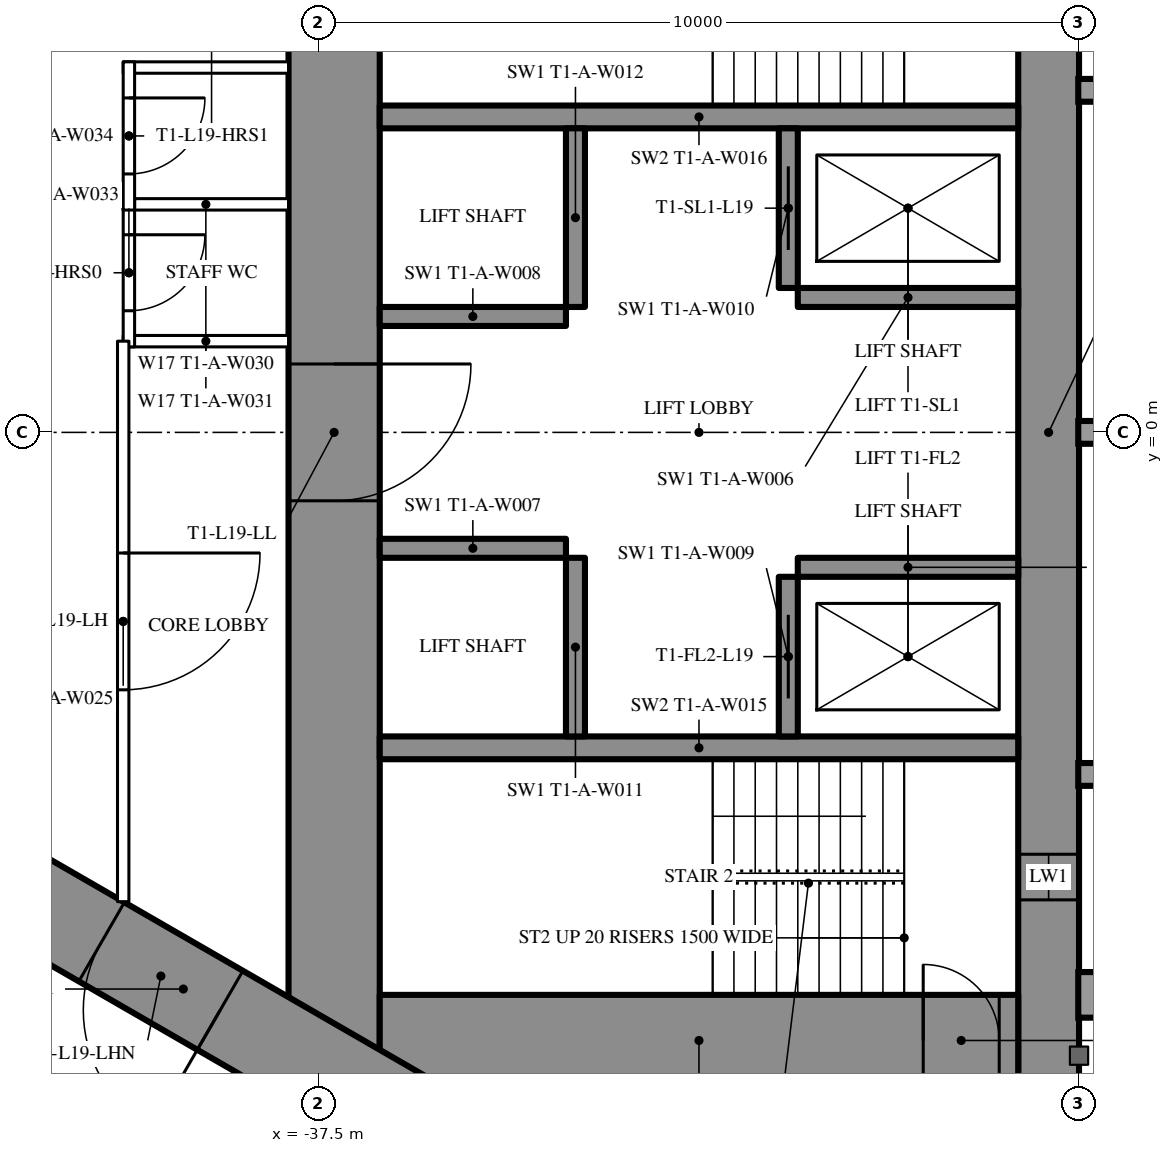
"""IFC4 building model, lengths in metres.
Left out: names, types, materials, properties, quantities, classifications, styles, units other than length and angle.
Written with IfcOpenShell. Run it as: python <this file> out.ifc"""

import sys

from ifc_helpers import new_model, si_unit, direction, frame, frame_2d, origin, place, context, subcontext, project, spatial, rectangle, extrude, element, fill, save


model = new_model("IFC4")
c1 = context("Model", 3, precision=1e-05, world=origin(), true_north=direction((0.0, 1.0)))
c2 = subcontext(c1, "Body", "Model", "MODEL_VIEW")
j1 = project(units=[si_unit("LENGTHUNIT", "METRE"), si_unit("PLANEANGLEUNIT", "RADIAN")], contexts=[c1])
p1 = place(None, origin())
s1 = spatial("IfcSite", under=j1, at=p1, CompositionType="ELEMENT")
p2 = place(p1, origin())
s2 = spatial("IfcBuilding", under=s1, at=p2, CompositionType="ELEMENT")
p3 = place(p2, frame((0.0, 0.0, 74.0)))
s3 = spatial("IfcBuildingStorey", under=s2, at=p3, CompositionType="ELEMENT", Elevation=74.0)
p4 = place(p3, frame((-27.9, 8.6, 0.0), z_axis=(0.0, 0.0, 1.0), x_axis=(0.0, -1.0, 0.0)))
e1 = element("IfcWall", 1, at=p4, inside=s3, PredefinedType="SHEAR", context=c2, shape_type="SweptSolid", body=[
    extrude(rectangle(XDim=17.2, YDim=0.8, at=frame_2d((8.6, 0.0))), origin(), (0.0, 0.0, 1.0), 3.5),
])
p5 = place(p4, frame((2.45, 0.0, 0.6)))
e2 = element("IfcOpeningElement", 2, at=p5, cuts=e1, PredefinedType="OPENING", context=c2, shape_type="SweptSolid", body=[
    extrude(rectangle(XDim=0.6, YDim=2.1, at=frame_2d((0.3, 1.05))), frame((0.0, 0.41, 0.0), z_axis=(0.0, -1.0, 0.0), x_axis=(1.0, 0.0, 0.0)), (0.0, 0.0, 1.0), 0.82),
])
p6 = place(p4, frame((14.15, 0.0, 0.6)))
e3 = element("IfcOpeningElement", 3, at=p6, cuts=e1, PredefinedType="OPENING", context=c2, shape_type="SweptSolid", body=[
    extrude(rectangle(XDim=0.6, YDim=2.1, at=frame_2d((0.3, 1.05))), frame((0.0, 0.41, 0.0), z_axis=(0.0, -1.0, 0.0), x_axis=(1.0, 0.0, 0.0)), (0.0, 0.0, 1.0), 0.82),
])
p7 = place(p3, frame((-37.3, 8.6, 0.0), z_axis=(0.0, 0.0, 1.0), x_axis=(0.0, -1.0, 0.0)))
e4 = element("IfcWall", 4, at=p7, inside=s3, PredefinedType="SHEAR", context=c2, shape_type="SweptSolid", body=[
    extrude(rectangle(XDim=17.2, YDim=1.2, at=frame_2d((8.6, 0.0))), origin(), (0.0, 0.0, 1.0), 3.5),
])
p8 = place(p7, frame((7.7, 0.0, 0.0)))
e5 = element("IfcOpeningElement", 5, at=p8, cuts=e4, PredefinedType="OPENING", context=c2, shape_type="SweptSolid", body=[
    extrude(rectangle(XDim=1.8, YDim=2.2, at=frame_2d((0.9, 1.1))), frame((0.0, 0.61, 0.0), z_axis=(0.0, -1.0, 0.0), x_axis=(1.0, 0.0, 0.0)), (0.0, 0.0, 1.0), 1.22),
])
p9 = place(p3, frame((-28.3, -8.0, 0.0), z_axis=(0.0, 0.0, 1.0), x_axis=(-1.0, 0.0, 0.0)))
e6 = element("IfcWall", 6, at=p9, inside=s3, PredefinedType="SHEAR", context=c2, shape_type="SweptSolid", body=[
    extrude(rectangle(XDim=8.4, YDim=1.2, at=frame_2d((4.2, 0.0))), origin(), (0.0, 0.0, 1.0), 3.5),
])
p10 = place(p9, frame((0.25, 0.0, 0.0)))
e7 = element("IfcOpeningElement", 7, at=p10, cuts=e6, PredefinedType="OPENING", context=c2, shape_type="SweptSolid", body=[
    extrude(rectangle(XDim=1.0, YDim=2.2, at=frame_2d((0.5, 1.1))), frame((0.0, 0.61, 0.0), z_axis=(0.0, -1.0, 0.0), x_axis=(1.0, 0.0, 0.0)), (0.0, 0.0, 1.0), 1.22),
])
for number, where, z_axis, x_axis in (
    (8, (-28.3, 4.15, 0.0), (0.0, 0.0, 1.0), (-1.0, 0.0, 0.0)),
    (9, (-28.3, -4.15, 0.0), (0.0, 0.0, 1.0), (-1.0, 0.0, 0.0)),
):
    element("IfcWall", number, at=place(p3, frame(where, z_axis=z_axis, x_axis=x_axis)), inside=s3, PredefinedType="SHEAR", context=c2, shape_type="SweptSolid", body=[
        extrude(rectangle(XDim=8.4, YDim=0.3, at=frame_2d((4.2, 0.0))), origin(), (0.0, 0.0, 1.0), 3.5),
    ])
p11 = place(p3, frame((-31.325, 4.0, 0.0), z_axis=(0.0, 0.0, 1.0), x_axis=(0.0, -1.0, 0.0)))
e10 = element("IfcWall", 10, at=p11, inside=s3, PredefinedType="SHEAR", context=c2, shape_type="SweptSolid", body=[
    extrude(rectangle(XDim=2.1, YDim=0.25, at=frame_2d((1.05, 0.0))), origin(), (0.0, 0.0, 1.0), 3.5),
])
p12 = place(p11, frame((0.5, 0.0, 0.0)))
e11 = element("IfcOpeningElement", 11, at=p12, cuts=e10, PredefinedType="OPENING", context=c2, shape_type="SweptSolid", body=[
    extrude(rectangle(XDim=1.1, YDim=2.2, at=frame_2d((0.55, 1.1))), frame((0.0, 0.135, 0.0), z_axis=(0.0, -1.0, 0.0), x_axis=(1.0, 0.0, 0.0)), (0.0, 0.0, 1.0), 0.27),
])
p13 = place(p3, frame((-34.125, 4.0, 0.0), z_axis=(0.0, 0.0, 1.0), x_axis=(0.0, -1.0, 0.0)))
e12 = element("IfcWall", 12, at=p13, inside=s3, PredefinedType="SHEAR", context=c2, shape_type="SweptSolid", body=[
    extrude(rectangle(XDim=2.35, YDim=0.25, at=frame_2d((1.175, 0.0))), origin(), (0.0, 0.0, 1.0), 3.5),
])
p14 = place(p3, frame((-28.3, 1.775, 0.0), z_axis=(0.0, 0.0, 1.0), x_axis=(-1.0, 0.0, 0.0)))
e13 = element("IfcWall", 13, at=p14, inside=s3, PredefinedType="SHEAR", context=c2, shape_type="SweptSolid", body=[
    extrude(rectangle(XDim=2.9, YDim=0.25, at=frame_2d((1.45, 0.0))), origin(), (0.0, 0.0, 1.0), 3.5),
])
p15 = place(p3, frame((-34.25, 1.525, 0.0), z_axis=(0.0, 0.0, 1.0), x_axis=(-1.0, 0.0, 0.0)))
e14 = element("IfcWall", 14, at=p15, inside=s3, PredefinedType="SHEAR", context=c2, shape_type="SweptSolid", body=[
    extrude(rectangle(XDim=2.45, YDim=0.25, at=frame_2d((1.225, 0.0))), origin(), (0.0, 0.0, 1.0), 3.5),
])
p16 = place(p3, frame((-31.325, -1.9, 0.0), z_axis=(0.0, 0.0, 1.0), x_axis=(0.0, -1.0, 0.0)))
e15 = element("IfcWall", 15, at=p16, inside=s3, PredefinedType="SHEAR", context=c2, shape_type="SweptSolid", body=[
    extrude(rectangle(XDim=2.1, YDim=0.25, at=frame_2d((1.05, 0.0))), origin(), (0.0, 0.0, 1.0), 3.5),
])
p17 = place(p16, frame((0.5, 0.0, 0.0)))
e16 = element("IfcOpeningElement", 16, at=p17, cuts=e15, PredefinedType="OPENING", context=c2, shape_type="SweptSolid", body=[
    extrude(rectangle(XDim=1.1, YDim=2.2, at=frame_2d((0.55, 1.1))), frame((0.0, 0.135, 0.0), z_axis=(0.0, -1.0, 0.0), x_axis=(1.0, 0.0, 0.0)), (0.0, 0.0, 1.0), 0.27),
])
p18 = place(p3, frame((-34.125, -1.65, 0.0), z_axis=(0.0, 0.0, 1.0), x_axis=(0.0, -1.0, 0.0)))
e17 = element("IfcWall", 17, at=p18, inside=s3, PredefinedType="SHEAR", context=c2, shape_type="SweptSolid", body=[
    extrude(rectangle(XDim=2.35, YDim=0.25, at=frame_2d((1.175, 0.0))), origin(), (0.0, 0.0, 1.0), 3.5),
])
p19 = place(p3, frame((-28.3, -1.775, 0.0), z_axis=(0.0, 0.0, 1.0), x_axis=(-1.0, 0.0, 0.0)))
e18 = element("IfcWall", 18, at=p19, inside=s3, PredefinedType="SHEAR", context=c2, shape_type="SweptSolid", body=[
    extrude(rectangle(XDim=2.9, YDim=0.25, at=frame_2d((1.45, 0.0))), origin(), (0.0, 0.0, 1.0), 3.5),
])
p20 = place(p3, frame((-34.25, -1.525, 0.0), z_axis=(0.0, 0.0, 1.0), x_axis=(-1.0, 0.0, 0.0)))
e19 = element("IfcWall", 19, at=p20, inside=s3, PredefinedType="SHEAR", context=c2, shape_type="SweptSolid", body=[
    extrude(rectangle(XDim=2.45, YDim=0.25, at=frame_2d((1.225, 0.0))), origin(), (0.0, 0.0, 1.0), 3.5),
])
p21 = place(p3, frame((-27.2, 14.3, 0.0), z_axis=(0.0, 0.0, 1.0), x_axis=(-0.866026593062, -0.499997940104, 0.0)))
e20 = element("IfcWall", 20, at=p21, inside=s3, PredefinedType="SHEAR", context=c2, shape_type="SweptSolid", body=[
    extrude(rectangle(XDim=28.946, YDim=1.2, at=frame_2d((14.473, 0.0))), origin(), (0.0, 0.0, 1.0), 3.5),
])
p22 = place(p21, frame((4.6, 0.0, 0.0)))
e21 = element("IfcOpeningElement", 21, at=p22, cuts=e20, PredefinedType="OPENING", context=c2, shape_type="SweptSolid", body=[
    extrude(rectangle(XDim=1.0, YDim=2.2, at=frame_2d((0.5, 1.1))), frame((0.0, 0.61, 0.0), z_axis=(0.0, -1.0, 0.0), x_axis=(1.0, 0.0, 0.0)), (0.0, 0.0, 1.0), 1.22),
])
p23 = place(p21, frame((13.395, 0.0, 0.0)))
e22 = element("IfcOpeningElement", 22, at=p23, cuts=e20, PredefinedType="OPENING", context=c2, shape_type="SweptSolid", body=[
    extrude(rectangle(XDim=1.8, YDim=2.2, at=frame_2d((0.9, 1.1))), frame((0.0, 0.61, 0.0), z_axis=(0.0, -1.0, 0.0), x_axis=(1.0, 0.0, 0.0)), (0.0, 0.0, 1.0), 1.22),
])
p24 = place(p3, frame((-27.2, -14.3, 0.0), z_axis=(0.0, 0.0, 1.0), x_axis=(-0.866024021859, 0.500002393557, 0.0)))
e23 = element("IfcWall", 23, at=p24, inside=s3, PredefinedType="SHEAR", context=c2, shape_type="SweptSolid", body=[
    extrude(rectangle(XDim=27.907, YDim=1.2, at=frame_2d((13.954, 0.0))), origin(), (0.0, 0.0, 1.0), 3.5),
])
p25 = place(p24, frame((4.6, 0.0, 0.0)))
e24 = element("IfcOpeningElement", 24, at=p25, cuts=e23, PredefinedType="OPENING", context=c2, shape_type="SweptSolid", body=[
    extrude(rectangle(XDim=1.0, YDim=2.2, at=frame_2d((0.5, 1.1))), frame((0.0, 0.61, 0.0), z_axis=(0.0, -1.0, 0.0), x_axis=(1.0, 0.0, 0.0)), (0.0, 0.0, 1.0), 1.22),
])
p26 = place(p24, frame((13.395, 0.0, 0.0)))
e25 = element("IfcOpeningElement", 25, at=p26, cuts=e23, PredefinedType="OPENING", context=c2, shape_type="SweptSolid", body=[
    extrude(rectangle(XDim=1.8, YDim=2.2, at=frame_2d((0.9, 1.1))), frame((0.0, 0.61, 0.0), z_axis=(0.0, -1.0, 0.0), x_axis=(1.0, 0.0, 0.0)), (0.0, 0.0, 1.0), 1.22),
])
p27 = place(p3, frame((-36.92, -11.344, 0.0), z_axis=(0.0, 0.0, 1.0), x_axis=(-0.866028313256, 0.499994960614, 0.0)))
e26 = element("IfcWall", 26, at=p27, inside=s3, PredefinedType="PARTITIONING", context=c2, shape_type="SweptSolid", body=[
    extrude(rectangle(XDim=22.568, YDim=0.2, at=frame_2d((11.284, 0.0))), origin(), (0.0, 0.0, 1.0), 3.25),
])
p28 = place(p27, frame((20.958, 0.0, 0.0)))
e27 = element("IfcOpeningElement", 27, at=p28, cuts=e26, PredefinedType="OPENING", context=c2, shape_type="SweptSolid", body=[
    extrude(rectangle(XDim=0.95, YDim=2.2, at=frame_2d((0.475, 1.1))), frame((0.0, 0.11, 0.0), z_axis=(0.0, -1.0, 0.0), x_axis=(1.0, 0.0, 0.0)), (0.0, 0.0, 1.0), 0.22),
])
p29 = place(p27, frame((12.68, 0.0, 0.0)))
e28 = element("IfcOpeningElement", 28, at=p29, cuts=e26, PredefinedType="OPENING", context=c2, shape_type="SweptSolid", body=[
    extrude(rectangle(XDim=0.95, YDim=2.2, at=frame_2d((0.475, 1.1))), frame((0.0, 0.11, 0.0), z_axis=(0.0, -1.0, 0.0), x_axis=(1.0, 0.0, 0.0)), (0.0, 0.0, 1.0), 0.22),
])
p30 = place(p27, frame((3.35, 0.0, 0.0)))
e29 = element("IfcOpeningElement", 29, at=p30, cuts=e26, PredefinedType="OPENING", context=c2, shape_type="SweptSolid", body=[
    extrude(rectangle(XDim=1.0, YDim=2.2, at=frame_2d((0.5, 1.1))), frame((0.0, 0.11, 0.0), z_axis=(0.0, -1.0, 0.0), x_axis=(1.0, 0.0, 0.0)), (0.0, 0.0, 1.0), 0.22),
])
for number, where, z_axis, x_axis in (
    (30, (-37.9, 1.2, 0.0), (0.0, 0.0, 1.0), (-1.0, 0.0, 0.0)),
    (31, (-37.9, 3.0, 0.0), (0.0, 0.0, 1.0), (-1.0, 0.0, 0.0)),
    (32, (-37.9, 4.8, 0.0), (0.0, 0.0, 1.0), (-1.0, 0.0, 0.0)),
):
    element("IfcWall", number, at=place(p3, frame(where, z_axis=z_axis, x_axis=x_axis)), inside=s3, PredefinedType="PARTITIONING", context=c2, shape_type="SweptSolid", body=[
        extrude(rectangle(XDim=2.175, YDim=0.15, at=frame_2d((1.087, 0.0))), origin(), (0.0, 0.0, 1.0), 3.25),
    ])
p31 = place(p3, frame((-40.0, 3.075, 0.0), z_axis=(0.0, 0.0, 1.0), x_axis=(0.0, -1.0, 0.0)))
e33 = element("IfcWall", 33, at=p31, inside=s3, PredefinedType="PARTITIONING", context=c2, shape_type="SweptSolid", body=[
    extrude(rectangle(XDim=1.95, YDim=0.15, at=frame_2d((0.975, 0.0))), origin(), (0.0, 0.0, 1.0), 3.25),
])
p32 = place(p31, frame((0.475, 0.0, 0.0)))
e34 = element("IfcOpeningElement", 34, at=p32, cuts=e33, PredefinedType="OPENING", context=c2, shape_type="SweptSolid", body=[
    extrude(rectangle(XDim=1.0, YDim=2.2, at=frame_2d((0.5, 1.1))), frame((0.0, 0.085, 0.0), z_axis=(0.0, -1.0, 0.0), x_axis=(1.0, 0.0, 0.0)), (0.0, 0.0, 1.0), 0.17),
])
p33 = place(p3, frame((-40.0, 4.875, 0.0), z_axis=(0.0, 0.0, 1.0), x_axis=(0.0, -1.0, 0.0)))
e35 = element("IfcWall", 35, at=p33, inside=s3, PredefinedType="PARTITIONING", context=c2, shape_type="SweptSolid", body=[
    extrude(rectangle(XDim=1.95, YDim=0.15, at=frame_2d((0.975, 0.0))), origin(), (0.0, 0.0, 1.0), 3.25),
])
p34 = place(p33, frame((0.475, 0.0, 0.0)))
e36 = element("IfcOpeningElement", 36, at=p34, cuts=e35, PredefinedType="OPENING", context=c2, shape_type="SweptSolid", body=[
    extrude(rectangle(XDim=1.0, YDim=2.2, at=frame_2d((0.5, 1.1))), frame((0.0, 0.085, 0.0), z_axis=(0.0, -1.0, 0.0), x_axis=(1.0, 0.0, 0.0)), (0.0, 0.0, 1.0), 0.17),
])
p35 = place(p3, frame((-40.075, 1.2, 0.0), z_axis=(0.0, 0.0, 1.0), x_axis=(0.0, -1.0, 0.0)))
e37 = element("IfcWall", 37, at=p35, inside=s3, PredefinedType="PARTITIONING", context=c2, shape_type="SweptSolid", body=[
    extrude(rectangle(XDim=7.374, YDim=0.15, at=frame_2d((3.687, 0.0))), origin(), (0.0, 0.0, 1.0), 3.25),
])
p36 = place(p35, frame((2.787, 0.0, 0.0)))
e38 = element("IfcOpeningElement", 38, at=p36, cuts=e37, PredefinedType="OPENING", context=c2, shape_type="SweptSolid", body=[
    extrude(rectangle(XDim=1.8, YDim=2.2, at=frame_2d((0.9, 1.1))), frame((0.0, 0.085, 0.0), z_axis=(0.0, -1.0, 0.0), x_axis=(1.0, 0.0, 0.0)), (0.0, 0.0, 1.0), 0.17),
])
p37 = place(p32, origin())
e39 = element("IfcDoor", 39, at=p37, inside=s3, OperationType="SINGLE_SWING_LEFT", PredefinedType="DOOR", context=c2, shape_type="SweptSolid", body=[
    extrude(rectangle(XDim=1.0, YDim=2.2, at=frame_2d((0.5, 1.1))), frame((0.0, 0.025, 0.0), z_axis=(0.0, -1.0, 0.0), x_axis=(1.0, 0.0, 0.0)), (0.0, 0.0, 1.0), 0.05),
])
fill(e34, e39)
p38 = place(p34, origin())
e40 = element("IfcDoor", 40, at=p38, inside=s3, OperationType="SINGLE_SWING_LEFT", PredefinedType="DOOR", context=c2, shape_type="SweptSolid", body=[
    extrude(rectangle(XDim=1.0, YDim=2.2, at=frame_2d((0.5, 1.1))), frame((0.0, 0.025, 0.0), z_axis=(0.0, -1.0, 0.0), x_axis=(1.0, 0.0, 0.0)), (0.0, 0.0, 1.0), 0.05),
])
fill(e36, e40)
p39 = place(p36, origin())
e41 = element("IfcDoor", 41, at=p39, inside=s3, OperationType="DOUBLE_DOOR_SINGLE_SWING", PredefinedType="DOOR", context=c2, shape_type="SweptSolid", body=[
    extrude(rectangle(XDim=1.8, YDim=2.2, at=frame_2d((0.9, 1.1))), frame((0.0, 0.025, 0.0), z_axis=(0.0, -1.0, 0.0), x_axis=(1.0, 0.0, 0.0)), (0.0, 0.0, 1.0), 0.05),
])
fill(e38, e41)
p40 = place(p26, origin())
e42 = element("IfcDoor", 42, at=p40, inside=s3, OperationType="DOUBLE_DOOR_SINGLE_SWING", PredefinedType="DOOR", context=c2, shape_type="SweptSolid", body=[
    extrude(rectangle(XDim=1.8, YDim=2.2, at=frame_2d((0.9, 1.1))), frame((0.0, 0.025, 0.0), z_axis=(0.0, -1.0, 0.0), x_axis=(1.0, 0.0, 0.0)), (0.0, 0.0, 1.0), 0.05),
])
fill(e25, e42)
p41 = place(p8, origin())
e43 = element("IfcDoor", 43, at=p41, inside=s3, OperationType="DOUBLE_DOOR_SINGLE_SWING", PredefinedType="DOOR", context=c2, shape_type="SweptSolid", body=[
    extrude(rectangle(XDim=1.8, YDim=2.2, at=frame_2d((0.9, 1.1))), frame((0.0, 0.025, 0.0), z_axis=(0.0, -1.0, 0.0), x_axis=(1.0, 0.0, 0.0)), (0.0, 0.0, 1.0), 0.05),
])
fill(e5, e43)
p42 = place(p10, origin())
e44 = element("IfcDoor", 44, at=p42, inside=s3, OperationType="SINGLE_SWING_RIGHT", PredefinedType="DOOR", context=c2, shape_type="SweptSolid", body=[
    extrude(rectangle(XDim=1.0, YDim=2.2, at=frame_2d((0.5, 1.1))), frame((0.0, 0.025, 0.0), z_axis=(0.0, -1.0, 0.0), x_axis=(1.0, 0.0, 0.0)), (0.0, 0.0, 1.0), 0.05),
])
fill(e7, e44)
p43 = place(p12, origin())
e45 = element("IfcDoor", 45, at=p43, inside=s3, OperationType="SLIDING_TO_LEFT", PredefinedType="USERDEFINED", context=c2, shape_type="SweptSolid", body=[
    extrude(rectangle(XDim=1.1, YDim=2.2, at=frame_2d((0.55, 1.1))), frame((0.0, 0.025, 0.0), z_axis=(0.0, -1.0, 0.0), x_axis=(1.0, 0.0, 0.0)), (0.0, 0.0, 1.0), 0.05),
])
fill(e11, e45)
p44 = place(p17, origin())
e46 = element("IfcDoor", 46, at=p44, inside=s3, OperationType="SLIDING_TO_LEFT", PredefinedType="USERDEFINED", context=c2, shape_type="SweptSolid", body=[
    extrude(rectangle(XDim=1.1, YDim=2.2, at=frame_2d((0.55, 1.1))), frame((0.0, 0.025, 0.0), z_axis=(0.0, -1.0, 0.0), x_axis=(1.0, 0.0, 0.0)), (0.0, 0.0, 1.0), 0.05),
])
fill(e16, e46)
p45 = place(p6, origin())
e47 = element("IfcWindow", 47, at=p45, inside=s3, PartitioningType="SINGLE_PANEL", PredefinedType="WINDOW", context=c2, shape_type="SweptSolid", body=[
    extrude(rectangle(XDim=0.6, YDim=2.1, at=frame_2d((0.3, 1.05))), frame((0.0, 0.03, 0.0), z_axis=(0.0, -1.0, 0.0), x_axis=(1.0, 0.0, 0.0)), (0.0, 0.0, 1.0), 0.06),
])
fill(e3, e47)
save(model, sys.argv[1])
